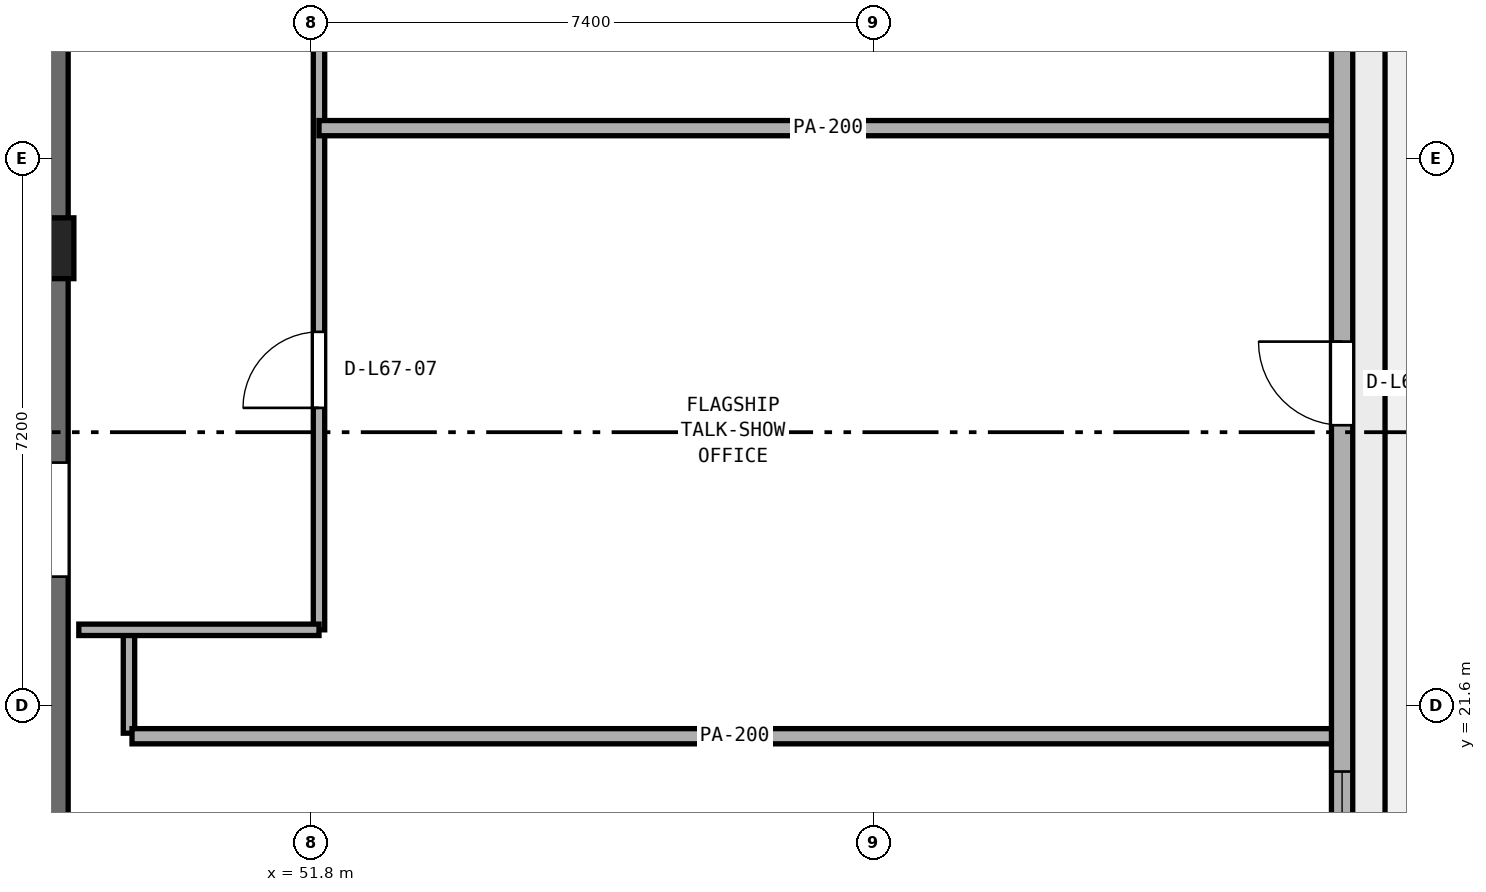
"""IFC4 building model, lengths in metres.
Left out: names, types, materials, properties, quantities, classifications, styles, units other than length and angle.
Written with IfcOpenShell. Run it as: python <this file> out.ifc"""

import sys

from ifc_helpers import new_model, si_unit, direction, frame, frame_2d, origin, origin_2d, place, context, subcontext, project, spatial, rectangle, extrude, element, fill, save


model = new_model("IFC4")
c1 = context("Model", 3, precision=1e-05, world=origin(), true_north=direction((0.0, 1.0)))
c2 = subcontext(c1, "Body", "Model", "MODEL_VIEW")
j1 = project(units=[si_unit("LENGTHUNIT", "METRE"), si_unit("PLANEANGLEUNIT", "RADIAN")], contexts=[c1])
p1 = place(None, origin())
s1 = spatial("IfcSite", under=j1, at=p1, CompositionType="ELEMENT")
p2 = place(p1, origin())
s2 = spatial("IfcBuilding", under=s1, at=p2, CompositionType="ELEMENT")
p3 = place(p2, frame((0.0, 0.0, 263.0)))
s3 = spatial("IfcBuildingStorey", under=s2, at=p3, CompositionType="ELEMENT", Elevation=263.0)
p4 = place(p3, frame((48.375, 17.45, 0.0), z_axis=(0.0, 0.0, 1.0), x_axis=(0.0, 1.0, 0.0)))
e1 = element("IfcWall", 1, at=p4, inside=s3, PredefinedType="SHEAR", context=c2, shape_type="SweptSolid", body=[
    extrude(rectangle(XDim=15.5, YDim=0.45, at=frame_2d((7.75, 0.0))), origin(), (0.0, 0.0, 1.0), 3.51),
])
p5 = place(p4, frame((5.85, 0.0, 0.0)))
e2 = element("IfcOpeningElement", 2, at=p5, cuts=e1, PredefinedType="OPENING", context=c2, shape_type="SweptSolid", body=[
    extrude(rectangle(XDim=1.5, YDim=2.15, at=frame_2d((0.75, 1.075))), frame((0.0, 0.235, 0.0), z_axis=(0.0, -1.0, 0.0), x_axis=(1.0, 0.0, 0.0)), (0.0, 0.0, 1.0), 0.47),
])
p6 = place(p3, frame((48.275, 27.62, 0.0), z_axis=(0.0, 0.0, 1.0), x_axis=(1.0, 0.0, 0.0)))
e3 = element("IfcColumn", 3, at=p6, inside=s3, PredefinedType="PILASTER", context=c2, shape_type="SweptSolid", body=[
    extrude(rectangle(XDim=0.8, YDim=0.8, at=origin_2d()), origin(), (0.0, 0.0, 1.0), 3.8),
])
p7 = place(p3, frame((51.9, 22.6, 0.0), z_axis=(0.0, 0.0, 1.0), x_axis=(0.0, 1.0, 0.0)))
e4 = element("IfcWall", 4, at=p7, inside=s3, PredefinedType="PARTITIONING", context=c2, shape_type="SweptSolid", body=[
    extrude(rectangle(XDim=24.235, YDim=0.15, at=frame_2d((12.117, 0.0))), origin(), (0.0, 0.0, 1.0), 3.51),
])
p8 = place(p7, frame((2.92, 0.0, 0.0)))
e5 = element("IfcOpeningElement", 5, at=p8, cuts=e4, PredefinedType="OPENING", context=c2, shape_type="SweptSolid", body=[
    extrude(rectangle(XDim=1.0, YDim=2.12, at=frame_2d((0.5, 1.06))), frame((0.0, 0.085, 0.0), z_axis=(0.0, -1.0, 0.0), x_axis=(1.0, 0.0, 0.0)), (0.0, 0.0, 1.0), 0.17),
])
p9 = place(p7, frame((9.85, 0.0, 0.0)))
e6 = element("IfcOpeningElement", 6, at=p9, cuts=e4, PredefinedType="OPENING", context=c2, shape_type="SweptSolid", body=[
    extrude(rectangle(XDim=1.0, YDim=2.12, at=frame_2d((0.5, 1.06))), frame((0.0, 0.085, 0.0), z_axis=(0.0, -1.0, 0.0), x_axis=(1.0, 0.0, 0.0)), (0.0, 0.0, 1.0), 0.17),
])
p10 = place(p3, frame((49.4, 21.24, 0.0), z_axis=(0.0, 0.0, 1.0), x_axis=(0.0, 1.0, 0.0)))
e7 = element("IfcWall", 7, at=p10, inside=s3, PredefinedType="PARTITIONING", context=c2, shape_type="SweptSolid", body=[
    extrude(rectangle(XDim=1.359, YDim=0.15, at=frame_2d((0.68, 0.0))), origin(), (0.0, 0.0, 1.0), 3.51),
])
p11 = place(p3, frame((49.44, 21.2, 0.0), z_axis=(0.0, 0.0, 1.0), x_axis=(1.0, 0.0, 0.0)))
e8 = element("IfcWall", 8, at=p11, inside=s3, PredefinedType="PARTITIONING", context=c2, shape_type="SweptSolid", body=[
    extrude(rectangle(XDim=15.855, YDim=0.2, at=frame_2d((7.927, 0.0))), origin(), (0.0, 0.0, 1.0), 3.51),
])
p12 = place(p3, frame((48.74, 22.6, 0.0), z_axis=(0.0, 0.0, 1.0), x_axis=(1.0, 0.0, 0.0)))
e9 = element("IfcWall", 9, at=p12, inside=s3, PredefinedType="PARTITIONING", context=c2, shape_type="SweptSolid", body=[
    extrude(rectangle(XDim=3.16, YDim=0.15, at=frame_2d((1.58, 0.0))), origin(), (0.0, 0.0, 1.0), 3.51),
])
p13 = place(p3, frame((51.9, 29.2, 0.0), z_axis=(0.0, 0.0, 1.0), x_axis=(1.0, 0.0, 0.0)))
e10 = element("IfcWall", 10, at=p13, inside=s3, PredefinedType="PARTITIONING", context=c2, shape_type="SweptSolid", body=[
    extrude(rectangle(XDim=13.395, YDim=0.2, at=frame_2d((6.698, 0.0))), origin(), (0.0, 0.0, 1.0), 3.51),
])
p14 = place(p3, frame((65.36, 16.258, 0.0), z_axis=(0.0, 0.0, 1.0), x_axis=(0.0, 1.0, 0.0)))
e11 = element("IfcWall", 11, at=p14, inside=s3, PredefinedType="STANDARD", context=c2, shape_type="SweptSolid", body=[
    extrude(rectangle(XDim=19.168, YDim=0.28, at=frame_2d((9.584, 0.0))), origin(), (0.0, 0.0, 1.0), 3.51),
])
p15 = place(p14, frame((9.034, 0.0, 0.0)))
e12 = element("IfcOpeningElement", 12, at=p15, cuts=e11, PredefinedType="OPENING", context=c2, shape_type="SweptSolid", body=[
    extrude(rectangle(XDim=1.1, YDim=2.2, at=frame_2d((0.55, 1.1))), frame((0.0, 0.15, 0.0), z_axis=(0.0, -1.0, 0.0), x_axis=(1.0, 0.0, 0.0)), (0.0, 0.0, 1.0), 0.3),
])
p16 = place(p14, frame((2.078, 0.0, 0.9)))
e13 = element("IfcOpeningElement", 13, at=p16, cuts=e11, PredefinedType="OPENING", context=c2, shape_type="SweptSolid", body=[
    extrude(rectangle(XDim=2.4, YDim=1.75, at=frame_2d((1.2, 0.875))), frame((0.0, 0.15, 0.0), z_axis=(0.0, -1.0, 0.0), x_axis=(1.0, 0.0, 0.0)), (0.0, 0.0, 1.0), 0.3),
])
p17 = place(p14, frame((14.44, 0.0, 0.9)))
e14 = element("IfcOpeningElement", 14, at=p17, cuts=e11, PredefinedType="OPENING", context=c2, shape_type="SweptSolid", body=[
    extrude(rectangle(XDim=2.4, YDim=1.75, at=frame_2d((1.2, 0.875))), frame((0.0, 0.15, 0.0), z_axis=(0.0, -1.0, 0.0), x_axis=(1.0, 0.0, 0.0)), (0.0, 0.0, 1.0), 0.3),
])
p18 = place(p5, origin())
e15 = element("IfcDoor", 15, at=p18, inside=s3, OperationType="DOUBLE_DOOR_SINGLE_SWING", PredefinedType="DOOR", context=c2, shape_type="SweptSolid", body=[
    extrude(rectangle(XDim=1.5, YDim=2.15, at=frame_2d((0.75, 1.075))), frame((0.0, 0.025, 0.0), z_axis=(0.0, -1.0, 0.0), x_axis=(1.0, 0.0, 0.0)), (0.0, 0.0, 1.0), 0.05),
])
fill(e2, e15)
p19 = place(p8, origin())
e16 = element("IfcDoor", 16, at=p19, inside=s3, OperationType="SINGLE_SWING_LEFT", PredefinedType="DOOR", context=c2, shape_type="SweptSolid", body=[
    extrude(rectangle(XDim=1.0, YDim=2.12, at=frame_2d((0.5, 1.06))), frame((0.0, 0.025, 0.0), z_axis=(0.0, -1.0, 0.0), x_axis=(1.0, 0.0, 0.0)), (0.0, 0.0, 1.0), 0.05),
])
fill(e5, e16)
p20 = place(p15, origin())
e17 = element("IfcDoor", 17, at=p20, inside=s3, OperationType="SINGLE_SWING_RIGHT", PredefinedType="DOOR", context=c2, shape_type="SweptSolid", body=[
    extrude(rectangle(XDim=1.1, YDim=2.2, at=frame_2d((0.55, 1.1))), frame((0.0, 0.025, 0.0), z_axis=(0.0, -1.0, 0.0), x_axis=(1.0, 0.0, 0.0)), (0.0, 0.0, 1.0), 0.05),
])
fill(e12, e17)
p21 = place(p16, origin())
e18 = element("IfcWindow", 18, at=p21, inside=s3, PartitioningType="SINGLE_PANEL", PredefinedType="WINDOW", context=c2, shape_type="SweptSolid", body=[
    extrude(rectangle(XDim=2.4, YDim=1.75, at=frame_2d((1.2, 0.875))), frame((0.0, 0.03, 0.0), z_axis=(0.0, -1.0, 0.0), x_axis=(1.0, 0.0, 0.0)), (0.0, 0.0, 1.0), 0.06),
])
fill(e13, e18)
save(model, sys.argv[1])
